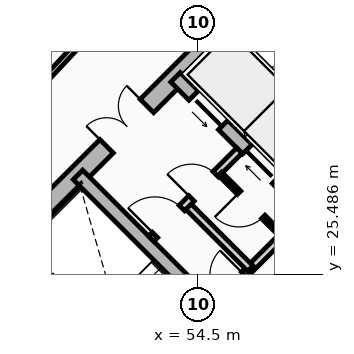
"""IFC4 building model, lengths in metres.
Left out: names, types, materials, properties, quantities, classifications, styles, units other than length and angle.
Written with IfcOpenShell. Run it as: python <this file> out.ifc"""

import sys

from ifc_helpers import new_model, si_unit, direction, frame, frame_2d, origin, place, context, subcontext, project, spatial, rectangle, extrude, source, transform, mapped, element, fill, save


model = new_model("IFC4")
c1 = context("Model", 3, precision=1e-05, world=origin(), true_north=direction((0.0, 1.0)))
c2 = subcontext(c1, "Body", "Model", "MODEL_VIEW")
j1 = project(units=[si_unit("LENGTHUNIT", "METRE"), si_unit("PLANEANGLEUNIT", "RADIAN")], contexts=[c1])
p1 = place(None, origin())
s1 = spatial("IfcSite", under=j1, at=p1, CompositionType="ELEMENT")
p2 = place(p1, origin())
s2 = spatial("IfcBuilding", under=s1, at=p2, CompositionType="ELEMENT")
p3 = place(p2, frame((0.0, 0.0, 45.28)))
s3 = spatial("IfcBuildingStorey", under=s2, at=p3, CompositionType="ELEMENT", Elevation=45.28)
for number, where, z_axis, x_axis in (
    (1, (58.773, 15.661, 0.0), (0.0, 0.0, 1.0), (-0.707, 0.707, 0.0)),
    (2, (66.339, 23.227, 0.0), (0.0, 0.0, 1.0), (-0.707, 0.707, 0.0)),
):
    element("IfcWall", number, at=place(p3, frame(where, z_axis=z_axis, x_axis=x_axis)), inside=s3, PredefinedType="SHEAR", context=c2, shape_type="SweptSolid", body=[
        extrude(rectangle(XDim=14.3, YDim=0.5, at=frame_2d((7.15, 0.0))), origin(), (0.0, 0.0, 1.0), 2.91),
    ])
p4 = place(p3, frame((48.838, 25.596, 0.0), z_axis=(0.0, 0.0, 1.0), x_axis=(0.707106781187, 0.707106781187, 0.0)))
e3 = element("IfcWall", 3, at=p4, inside=s3, PredefinedType="SHEAR", context=c2, shape_type="SweptSolid", body=[
    extrude(rectangle(XDim=10.7, YDim=0.5, at=frame_2d((5.35, 0.0))), origin(), (0.0, 0.0, 1.0), 2.91),
])
m1 = source(origin(), c2, "Body", "SweptSolid", [
    extrude(rectangle(XDim=1.5, YDim=2.02, at=frame_2d((0.75, 1.01))), frame((0.0, 0.26, 0.0), z_axis=(0.0, -1.0, 0.0), x_axis=(1.0, 0.0, 0.0)), (0.0, 0.0, 1.0), 0.52),
])
p5 = place(p4, frame((4.6, 0.0, 0.0)))
e4 = element("IfcOpeningElement", 4, at=p5, cuts=e3, PredefinedType="OPENING", context=c2, shape_type="MappedRepresentation", body=[
    mapped(m1, transform((0.0, 0.0, 0.0), x_axis=(1.0, 0.0, 0.0), y_axis=(0.0, 1.0, 0.0), z_axis=(0.0, 0.0, 1.0), scale=1.0)),
])
p6 = place(p3, frame((61.096, 18.338, 0.0), z_axis=(0.0, 0.0, 1.0), x_axis=(-0.707106781187, 0.707106781187, 0.0)))
e5 = element("IfcWall", 5, at=p6, inside=s3, PredefinedType="SHEAR", context=c2, shape_type="SweptSolid", body=[
    extrude(rectangle(XDim=13.8, YDim=0.35, at=frame_2d((6.9, 0.0))), origin(), (0.0, 0.0, 1.0), 2.91),
])
m2 = source(origin(), c2, "Body", "SweptSolid", [
    extrude(rectangle(XDim=1.1, YDim=2.015, at=frame_2d((0.55, 1.007))), frame((0.0, 0.185, 0.0), z_axis=(0.0, -1.0, 0.0), x_axis=(1.0, 0.0, 0.0)), (0.0, 0.0, 1.0), 0.37),
])
p7 = place(p6, frame((4.9, 0.0, 0.0)))
e6 = element("IfcOpeningElement", 6, at=p7, cuts=e5, PredefinedType="OPENING", context=c2, shape_type="MappedRepresentation", body=[
    mapped(m2, transform((0.0, 0.0, 0.0), x_axis=(1.0, 0.0, 0.0), y_axis=(0.0, 1.0, 0.0), z_axis=(0.0, 0.0, 1.0), scale=1.0)),
])
m3 = source(origin(), c2, "Body", "SweptSolid", [
    extrude(rectangle(XDim=1.15, YDim=2.02, at=frame_2d((0.575, 1.01))), frame((0.0, 0.185, 0.0), z_axis=(0.0, -1.0, 0.0), x_axis=(1.0, 0.0, 0.0)), (0.0, 0.0, 1.0), 0.37),
])
p8 = place(p6, frame((7.32, 0.0, 0.0)))
e7 = element("IfcOpeningElement", 7, at=p8, cuts=e5, PredefinedType="OPENING", context=c2, shape_type="MappedRepresentation", body=[
    mapped(m3, transform((0.0, 0.0, 0.0), x_axis=(1.0, 0.0, 0.0), y_axis=(0.0, 1.0, 0.0), z_axis=(0.0, 0.0, 1.0), scale=1.0)),
])
p9 = place(p3, frame((63.662, 20.904, 0.0), z_axis=(0.0, 0.0, 1.0), x_axis=(-0.707106781187, 0.707106781187, 0.0)))
e8 = element("IfcWall", 8, at=p9, inside=s3, PredefinedType="SHEAR", context=c2, shape_type="SweptSolid", body=[
    extrude(rectangle(XDim=13.8, YDim=0.35, at=frame_2d((6.9, 0.0))), origin(), (0.0, 0.0, 1.0), 2.91),
])
p10 = place(p9, frame((10.025, 0.0, 0.0)))
e9 = element("IfcOpeningElement", 9, at=p10, cuts=e8, PredefinedType="OPENING", context=c2, shape_type="MappedRepresentation", body=[
    mapped(m2, transform((0.0, 0.0, 0.0), x_axis=(1.0, 0.0, 0.0), y_axis=(0.0, 1.0, 0.0), z_axis=(0.0, 0.0, 1.0), scale=1.0)),
])
p11 = place(p9, frame((12.025, 0.0, 0.0)))
e10 = element("IfcOpeningElement", 10, at=p11, cuts=e8, PredefinedType="OPENING", context=c2, shape_type="MappedRepresentation", body=[
    mapped(m2, transform((0.0, 0.0, 0.0), x_axis=(1.0, 0.0, 0.0), y_axis=(0.0, 1.0, 0.0), z_axis=(0.0, 0.0, 1.0), scale=1.0)),
])
p12 = place(p9, frame((5.33, 0.0, 0.0)))
e11 = element("IfcOpeningElement", 11, at=p12, cuts=e8, PredefinedType="OPENING", context=c2, shape_type="MappedRepresentation", body=[
    mapped(m3, transform((0.0, 0.0, 0.0), x_axis=(1.0, 0.0, 0.0), y_axis=(0.0, 1.0, 0.0), z_axis=(0.0, 0.0, 1.0), scale=1.0)),
])
p13 = place(p3, frame((53.922, 21.141, 0.0), z_axis=(0.0, 0.0, 1.0), x_axis=(-0.707106781187, 0.707106781187, 0.0)))
e12 = element("IfcWall", 12, at=p13, inside=s3, PredefinedType="SHEAR", context=c2, shape_type="SweptSolid", body=[
    extrude(rectangle(XDim=6.745, YDim=0.35, at=frame_2d((3.373, 0.0))), origin(), (0.0, 0.0, 1.0), 2.91),
])
p14 = place(p3, frame((55.615, 29.227, 0.0), z_axis=(0.0, 0.0, 1.0), x_axis=(0.707147878904, 0.70706568108, 0.0)))
e13 = element("IfcWall", 13, at=p14, inside=s3, PredefinedType="SHEAR", context=c2, shape_type="SweptSolid", body=[
    extrude(rectangle(XDim=2.97, YDim=0.2, at=frame_2d((1.485, 0.0))), origin(), (0.0, 0.0, 1.0), 2.91),
])
p15 = place(p3, frame((57.419, 31.2, 0.0), z_axis=(0.0, 0.0, 1.0), x_axis=(-0.707032117043, 0.707181437447, 0.0)))
e14 = element("IfcWall", 14, at=p15, inside=s3, PredefinedType="SHEAR", context=c2, shape_type="SweptSolid", body=[
    extrude(rectangle(XDim=1.635, YDim=0.2, at=frame_2d((0.817, 0.0))), origin(), (0.0, 0.0, 1.0), 2.91),
])
p16 = place(p3, frame((54.961, 24.719, 0.0), z_axis=(0.0, 0.0, 1.0), x_axis=(0.707106781187, 0.707106781187, 0.0)))
e15 = element("IfcWall", 15, at=p16, inside=s3, PredefinedType="PARTITIONING", context=c2, shape_type="SweptSolid", body=[
    extrude(rectangle(XDim=3.28, YDim=0.2, at=frame_2d((1.64, 0.0))), origin(), (0.0, 0.0, 1.0), 2.635),
])
m4 = source(origin(), c2, "Body", "SweptSolid", [
    extrude(rectangle(XDim=0.9, YDim=2.005, at=frame_2d((0.45, 1.002))), frame((0.0, 0.11, 0.0), z_axis=(0.0, -1.0, 0.0), x_axis=(1.0, 0.0, 0.0)), (0.0, 0.0, 1.0), 0.22),
])
p17 = place(p16, frame((0.16, 0.0, 0.0)))
e16 = element("IfcOpeningElement", 16, at=p17, cuts=e15, PredefinedType="OPENING", context=c2, shape_type="MappedRepresentation", body=[
    mapped(m4, transform((0.0, 0.0, 0.0), x_axis=(1.0, 0.0, 0.0), y_axis=(0.0, 1.0, 0.0), z_axis=(0.0, 0.0, 1.0), scale=1.0)),
])
p18 = place(p3, frame((55.874, 25.631, 0.0), z_axis=(0.0, 0.0, 1.0), x_axis=(-0.707157639372, 0.707055919343, 0.0)))
e17 = element("IfcWall", 17, at=p18, inside=s3, PredefinedType="PARTITIONING", context=c2, shape_type="SweptSolid", body=[
    extrude(rectangle(XDim=2.4, YDim=0.2, at=frame_2d((1.2, 0.0))), origin(), (0.0, 0.0, 1.0), 2.635),
])
p19 = place(p3, frame((53.264, 26.416, 0.0), z_axis=(0.0, 0.0, 1.0), x_axis=(0.707106781187, 0.707106781187, 0.0)))
e18 = element("IfcWall", 18, at=p19, inside=s3, PredefinedType="PARTITIONING", context=c2, shape_type="SweptSolid", body=[
    extrude(rectangle(XDim=3.28, YDim=0.2, at=frame_2d((1.64, 0.0))), origin(), (0.0, 0.0, 1.0), 2.635),
])
m5 = source(origin(), c2, "Body", "SweptSolid", [
    extrude(rectangle(XDim=1.0, YDim=2.015, at=frame_2d((0.5, 1.007))), frame((0.0, 0.11, 0.0), z_axis=(0.0, -1.0, 0.0), x_axis=(1.0, 0.0, 0.0)), (0.0, 0.0, 1.0), 0.22),
])
p20 = place(p19, frame((0.14, 0.0, 0.0)))
e19 = element("IfcOpeningElement", 19, at=p20, cuts=e18, PredefinedType="OPENING", context=c2, shape_type="MappedRepresentation", body=[
    mapped(m5, transform((0.0, 0.0, 0.0), x_axis=(1.0, 0.0, 0.0), y_axis=(0.0, 1.0, 0.0), z_axis=(0.0, 0.0, 1.0), scale=1.0)),
])
p21 = place(p19, frame((1.5, 0.0, 0.0)))
e20 = element("IfcOpeningElement", 20, at=p21, cuts=e18, PredefinedType="OPENING", context=c2, shape_type="MappedRepresentation", body=[
    mapped(m4, transform((0.0, 0.0, 0.0), x_axis=(1.0, 0.0, 0.0), y_axis=(0.0, 1.0, 0.0), z_axis=(0.0, 0.0, 1.0), scale=1.0)),
])
p22 = place(p3, frame((56.673, 26.529, 0.0), z_axis=(0.0, 0.0, 1.0), x_axis=(-0.707052764397, 0.70716079385, 0.0)))
e21 = element("IfcWall", 21, at=p22, inside=s3, PredefinedType="PARTITIONING", context=c2, shape_type="SweptSolid", body=[
    extrude(rectangle(XDim=2.26, YDim=0.125, at=frame_2d((1.13, 0.0))), origin(), (0.0, 0.0, 1.0), 2.635),
])
m6 = source(origin(), c2, "Body", "SweptSolid", [
    extrude(rectangle(XDim=0.9, YDim=2.005, at=frame_2d((0.45, 1.002))), frame((0.0, 0.073, 0.0), z_axis=(0.0, -1.0, 0.0), x_axis=(1.0, 0.0, 0.0)), (0.0, 0.0, 1.0), 0.145),
])
p23 = place(p22, frame((0.65, 0.0, 0.0)))
e22 = element("IfcOpeningElement", 22, at=p23, cuts=e21, PredefinedType="OPENING", context=c2, shape_type="MappedRepresentation", body=[
    mapped(m6, transform((0.0, 0.0, 0.0), x_axis=(1.0, 0.0, 0.0), y_axis=(0.0, 1.0, 0.0), z_axis=(0.0, 0.0, 1.0), scale=1.0)),
])
p24 = place(p3, frame((52.043, 32.28, 0.0), z_axis=(0.0, 0.0, 1.0), x_axis=(-0.682606081633, -0.730786519661, 0.0)))
e23 = element("IfcWall", 23, at=p24, inside=s3, PredefinedType="PARTITIONING", context=c2, shape_type="SweptSolid", body=[
    extrude(rectangle(XDim=6.527, YDim=0.15, at=frame_2d((3.263, 0.0))), origin(), (0.0, 0.0, 1.0), 2.159),
])
m7 = source(origin(), c2, "Body", "SweptSolid", [
    extrude(rectangle(XDim=1.1, YDim=2.015, at=frame_2d((0.55, 1.007))), frame((0.0, 0.025, 0.0), z_axis=(0.0, -1.0, 0.0), x_axis=(1.0, 0.0, 0.0)), (0.0, 0.0, 1.0), 0.05),
])
p25 = place(p10, origin())
e24 = element("IfcDoor", 24, at=p25, inside=s3, OperationType="SLIDING_TO_RIGHT", PredefinedType="DOOR", context=c2, shape_type="MappedRepresentation", body=[
    mapped(m7, transform((0.0, 0.0, 0.0), x_axis=(1.0, 0.0, 0.0), y_axis=(0.0, 1.0, 0.0), z_axis=(0.0, 0.0, 1.0), scale=1.0)),
])
fill(e9, e24)
p26 = place(p11, origin())
e25 = element("IfcDoor", 25, at=p26, inside=s3, OperationType="SLIDING_TO_LEFT", PredefinedType="DOOR", context=c2, shape_type="MappedRepresentation", body=[
    mapped(m7, transform((0.0, 0.0, 0.0), x_axis=(1.0, 0.0, 0.0), y_axis=(0.0, 1.0, 0.0), z_axis=(0.0, 0.0, 1.0), scale=1.0)),
])
fill(e10, e25)
m8 = source(origin(), c2, "Body", "SweptSolid", [
    extrude(rectangle(XDim=1.5, YDim=2.02, at=frame_2d((0.75, 1.01))), frame((0.0, 0.025, 0.0), z_axis=(0.0, -1.0, 0.0), x_axis=(1.0, 0.0, 0.0)), (0.0, 0.0, 1.0), 0.05),
])
p27 = place(p5, origin())
e26 = element("IfcDoor", 26, at=p27, inside=s3, OperationType="DOUBLE_DOOR_SINGLE_SWING", PredefinedType="DOOR", context=c2, shape_type="MappedRepresentation", body=[
    mapped(m8, transform((0.0, 0.0, 0.0), x_axis=(1.0, 0.0, 0.0), y_axis=(0.0, 1.0, 0.0), z_axis=(0.0, 0.0, 1.0), scale=1.0)),
])
fill(e4, e26)
m9 = source(origin(), c2, "Body", "SweptSolid", [
    extrude(rectangle(XDim=0.9, YDim=2.005, at=frame_2d((0.45, 1.002))), frame((0.0, 0.025, 0.0), z_axis=(0.0, -1.0, 0.0), x_axis=(1.0, 0.0, 0.0)), (0.0, 0.0, 1.0), 0.05),
])
p28 = place(p17, origin())
e27 = element("IfcDoor", 27, at=p28, inside=s3, OperationType="SINGLE_SWING_RIGHT", PredefinedType="DOOR", context=c2, shape_type="MappedRepresentation", body=[
    mapped(m9, transform((0.0, 0.0, 0.0), x_axis=(1.0, 0.0, 0.0), y_axis=(0.0, 1.0, 0.0), z_axis=(0.0, 0.0, 1.0), scale=1.0)),
])
fill(e16, e27)
m10 = source(origin(), c2, "Body", "SweptSolid", [
    extrude(rectangle(XDim=1.0, YDim=2.015, at=frame_2d((0.5, 1.007))), frame((0.0, 0.025, 0.0), z_axis=(0.0, -1.0, 0.0), x_axis=(1.0, 0.0, 0.0)), (0.0, 0.0, 1.0), 0.05),
])
p29 = place(p20, origin())
e28 = element("IfcDoor", 28, at=p29, inside=s3, OperationType="SINGLE_SWING_LEFT", PredefinedType="DOOR", context=c2, shape_type="MappedRepresentation", body=[
    mapped(m10, transform((0.0, 0.0, 0.0), x_axis=(1.0, 0.0, 0.0), y_axis=(0.0, 1.0, 0.0), z_axis=(0.0, 0.0, 1.0), scale=1.0)),
])
fill(e19, e28)
p30 = place(p21, origin())
e29 = element("IfcDoor", 29, at=p30, inside=s3, OperationType="SINGLE_SWING_LEFT", PredefinedType="DOOR", context=c2, shape_type="MappedRepresentation", body=[
    mapped(m9, transform((0.0, 0.0, 0.0), x_axis=(1.0, 0.0, 0.0), y_axis=(0.0, 1.0, 0.0), z_axis=(0.0, 0.0, 1.0), scale=1.0)),
])
fill(e20, e29)
p31 = place(p23, origin())
e30 = element("IfcDoor", 30, at=p31, inside=s3, OperationType="SINGLE_SWING_RIGHT", PredefinedType="DOOR", context=c2, shape_type="MappedRepresentation", body=[
    mapped(m9, transform((0.0, 0.0, 0.0), x_axis=(1.0, 0.0, 0.0), y_axis=(0.0, 1.0, 0.0), z_axis=(0.0, 0.0, 1.0), scale=1.0)),
])
fill(e22, e30)
save(model, sys.argv[1])
